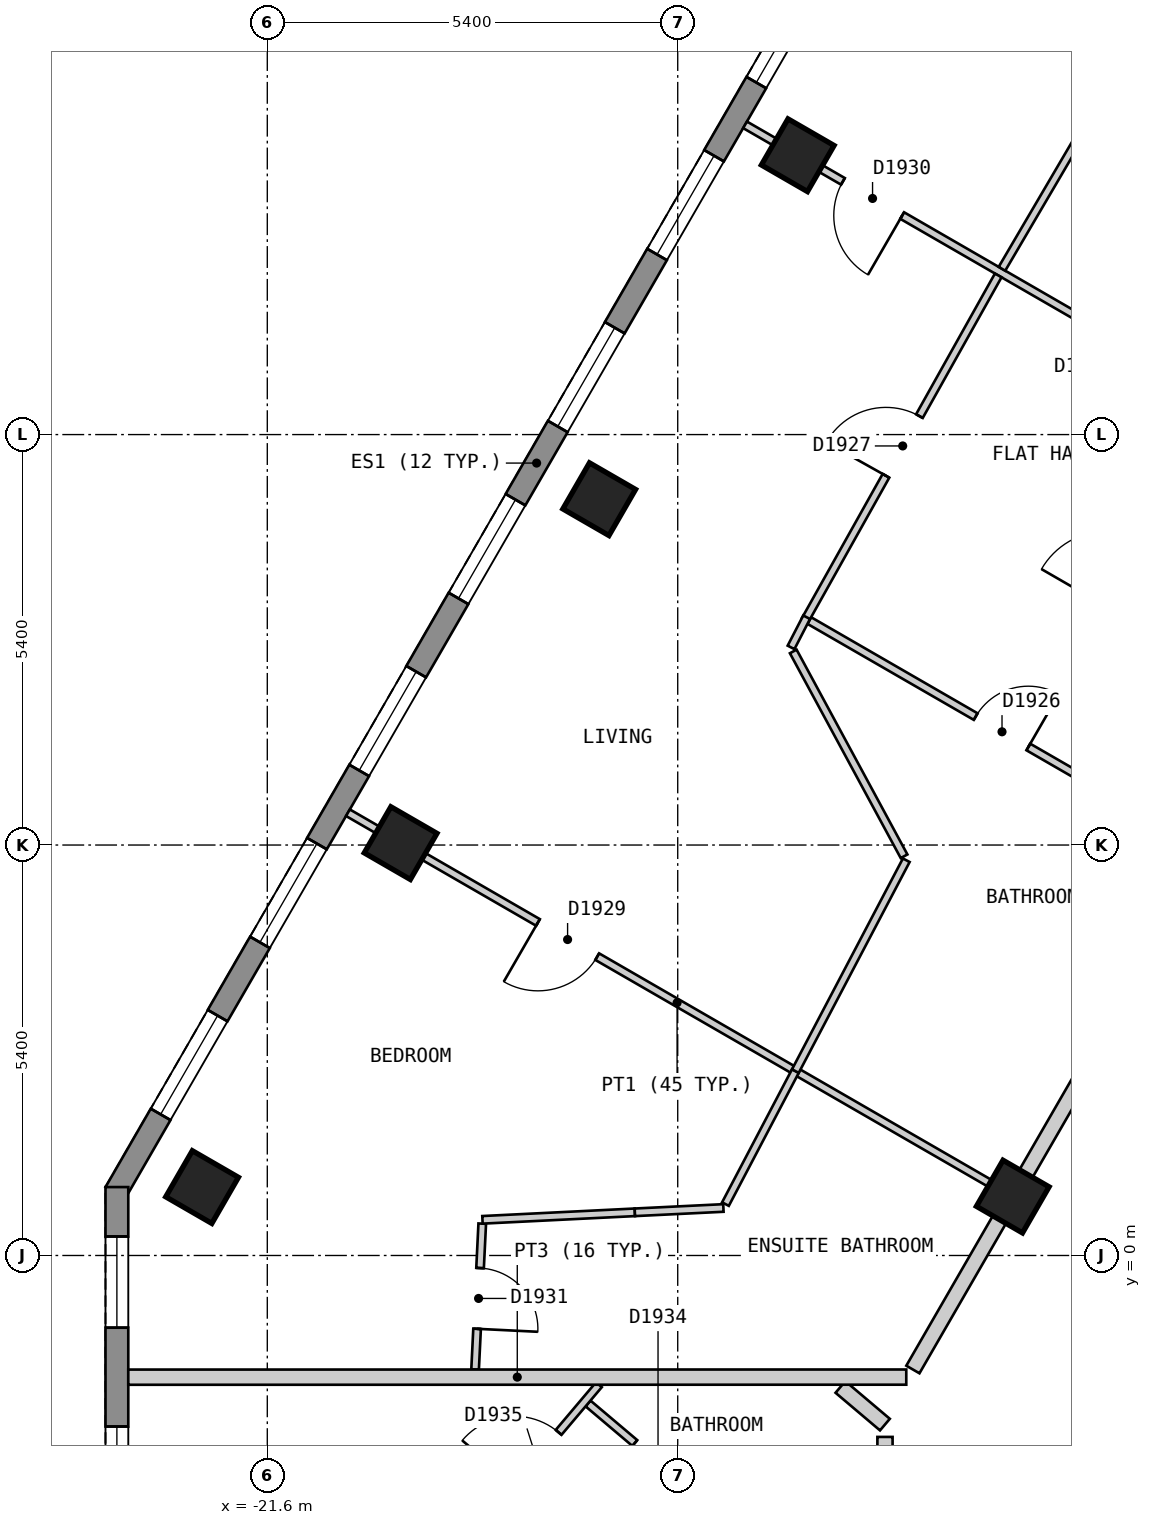
"""IFC4 building model, lengths in metres.
Left out: names, types, materials, properties, quantities, classifications, styles, units other than length and angle.
Written with IfcOpenShell. Run it as: python <this file> out.ifc"""

import sys

from ifc_helpers import new_model, si_unit, direction, frame, frame_2d, origin, origin_2d, place, context, subcontext, project, spatial, polyline, rectangle, outline, extrude, element, fill, save


model = new_model("IFC4")
c1 = context("Model", 3, precision=1e-05, world=origin(), true_north=direction((0.0, 1.0)))
c2 = subcontext(c1, "Body", "Model", "MODEL_VIEW")
j1 = project(units=[si_unit("LENGTHUNIT", "METRE"), si_unit("PLANEANGLEUNIT", "RADIAN")], contexts=[c1])
p1 = place(None, origin())
s1 = spatial("IfcSite", under=j1, at=p1, CompositionType="ELEMENT")
p2 = place(p1, origin())
s2 = spatial("IfcBuilding", under=s1, at=p2, CompositionType="ELEMENT")
p3 = place(p2, frame((0.0, 0.0, 220.8)))
s3 = spatial("IfcBuildingStorey", under=s2, at=p3, CompositionType="ELEMENT", Elevation=220.8)
for number, where, z_axis, x_axis in (
    (1, (-14.621, 14.475, 0.0), (0.0, 0.0, 1.0), (-0.5, -0.866, 0.0)),
    (2, (-17.233, 9.95, 0.0), (0.0, 0.0, 1.0), (-0.5, -0.866, 0.0)),
    (3, (-19.846, 5.425, 0.0), (0.0, 0.0, 1.0), (-0.5, -0.866, 0.0)),
    (4, (-22.458, 0.9, 0.0), (0.0, 0.0, 1.0), (-0.5, -0.866, 0.0)),
    (5, (-11.792, 0.775, 0.0), (0.0, 0.0, 1.0), (-0.5, -0.866, 0.0)),
):
    element("IfcColumn", number, at=place(p3, frame(where, z_axis=z_axis, x_axis=x_axis)), inside=s3, PredefinedType="COLUMN", context=c2, shape_type="SweptSolid", body=[
        extrude(rectangle(XDim=0.7, YDim=0.7, at=origin_2d()), origin(), (0.0, 0.0, 1.0), 3.0),
    ])
p4 = place(p3, frame((-12.514, 20.025, 0.0), z_axis=(0.0, 0.0, 1.0), x_axis=(-0.500003656944, -0.866023292436, 0.0)))
e6 = element("IfcWall", 6, at=p4, inside=s3, PredefinedType="SOLIDWALL", context=c2, shape_type="SweptSolid", body=[
    extrude(outline(polyline([(0.0, -0.15), (22.17, -0.15), (22.09, 0.15), (0.08, 0.15), (0.0, -0.15)])), origin(), (0.0, 0.0, 1.0), 2.7),
])
p5 = place(p4, frame((1.191, 0.0, 0.15)))
e7 = element("IfcOpeningElement", 7, at=p5, cuts=e6, PredefinedType="OPENING", context=c2, shape_type="SweptSolid", body=[
    extrude(rectangle(XDim=1.5, YDim=2.1, at=frame_2d((0.75, 1.05))), frame((0.0, 0.16, 0.0), z_axis=(0.0, -1.0, 0.0), x_axis=(1.0, 0.0, 0.0)), (0.0, 0.0, 1.0), 0.32),
])
p6 = place(p4, frame((3.804, 0.0, 0.15)))
e8 = element("IfcOpeningElement", 8, at=p6, cuts=e6, PredefinedType="OPENING", context=c2, shape_type="SweptSolid", body=[
    extrude(rectangle(XDim=1.5, YDim=2.1, at=frame_2d((0.75, 1.05))), frame((0.0, 0.16, 0.0), z_axis=(0.0, -1.0, 0.0), x_axis=(1.0, 0.0, 0.0)), (0.0, 0.0, 1.0), 0.32),
])
p7 = place(p4, frame((6.416, 0.0, 0.15)))
e9 = element("IfcOpeningElement", 9, at=p7, cuts=e6, PredefinedType="OPENING", context=c2, shape_type="SweptSolid", body=[
    extrude(rectangle(XDim=1.5, YDim=2.1, at=frame_2d((0.75, 1.05))), frame((0.0, 0.16, 0.0), z_axis=(0.0, -1.0, 0.0), x_axis=(1.0, 0.0, 0.0)), (0.0, 0.0, 1.0), 0.32),
])
p8 = place(p4, frame((9.029, 0.0, 0.15)))
e10 = element("IfcOpeningElement", 10, at=p8, cuts=e6, PredefinedType="OPENING", context=c2, shape_type="SweptSolid", body=[
    extrude(rectangle(XDim=1.5, YDim=2.1, at=frame_2d((0.75, 1.05))), frame((0.0, 0.16, 0.0), z_axis=(0.0, -1.0, 0.0), x_axis=(1.0, 0.0, 0.0)), (0.0, 0.0, 1.0), 0.32),
])
p9 = place(p4, frame((11.641, 0.0, 0.15)))
e11 = element("IfcOpeningElement", 11, at=p9, cuts=e6, PredefinedType="OPENING", context=c2, shape_type="SweptSolid", body=[
    extrude(rectangle(XDim=1.5, YDim=2.1, at=frame_2d((0.75, 1.05))), frame((0.0, 0.16, 0.0), z_axis=(0.0, -1.0, 0.0), x_axis=(1.0, 0.0, 0.0)), (0.0, 0.0, 1.0), 0.32),
])
p10 = place(p4, frame((14.254, 0.0, 0.15)))
e12 = element("IfcOpeningElement", 12, at=p10, cuts=e6, PredefinedType="OPENING", context=c2, shape_type="SweptSolid", body=[
    extrude(rectangle(XDim=1.5, YDim=2.1, at=frame_2d((0.75, 1.05))), frame((0.0, 0.16, 0.0), z_axis=(0.0, -1.0, 0.0), x_axis=(1.0, 0.0, 0.0)), (0.0, 0.0, 1.0), 0.32),
])
p11 = place(p4, frame((16.866, 0.0, 0.15)))
e13 = element("IfcOpeningElement", 13, at=p11, cuts=e6, PredefinedType="OPENING", context=c2, shape_type="SweptSolid", body=[
    extrude(rectangle(XDim=1.5, YDim=2.1, at=frame_2d((0.75, 1.05))), frame((0.0, 0.16, 0.0), z_axis=(0.0, -1.0, 0.0), x_axis=(1.0, 0.0, 0.0)), (0.0, 0.0, 1.0), 0.32),
])
p12 = place(p4, frame((19.479, 0.0, 0.15)))
e14 = element("IfcOpeningElement", 14, at=p12, cuts=e6, PredefinedType="OPENING", context=c2, shape_type="SweptSolid", body=[
    extrude(rectangle(XDim=1.5, YDim=2.1, at=frame_2d((0.75, 1.05))), frame((0.0, 0.16, 0.0), z_axis=(0.0, -1.0, 0.0), x_axis=(1.0, 0.0, 0.0)), (0.0, 0.0, 1.0), 0.32),
])
p13 = place(p3, frame((-23.579, 0.9, 0.0), z_axis=(0.0, 0.0, 1.0), x_axis=(0.0, -1.0, 0.0)))
e15 = element("IfcWall", 15, at=p13, inside=s3, PredefinedType="SOLIDWALL", context=c2, shape_type="SweptSolid", body=[
    extrude(outline(polyline([(0.0, -0.15), (5.0, -0.15), (4.92, 0.15), (0.08, 0.15), (0.0, -0.15)])), origin(), (0.0, 0.0, 1.0), 2.7),
])
p14 = place(p13, frame((0.65, 0.0, 0.15)))
e16 = element("IfcOpeningElement", 16, at=p14, cuts=e15, PredefinedType="OPENING", context=c2, shape_type="SweptSolid", body=[
    extrude(rectangle(XDim=1.2, YDim=2.1, at=frame_2d((0.6, 1.05))), frame((0.0, 0.16, 0.0), z_axis=(0.0, -1.0, 0.0), x_axis=(1.0, 0.0, 0.0)), (0.0, 0.0, 1.0), 0.32),
])
p15 = place(p13, frame((3.15, 0.0, 0.15)))
e17 = element("IfcOpeningElement", 17, at=p15, cuts=e15, PredefinedType="OPENING", context=c2, shape_type="SweptSolid", body=[
    extrude(rectangle(XDim=1.2, YDim=2.1, at=frame_2d((0.6, 1.05))), frame((0.0, 0.16, 0.0), z_axis=(0.0, -1.0, 0.0), x_axis=(1.0, 0.0, 0.0)), (0.0, 0.0, 1.0), 0.32),
])
p16 = place(p3, frame((-13.106, -1.5, 0.0), z_axis=(0.0, 0.0, 1.0), x_axis=(0.500025705601, 0.86601056214, 0.0)))
e18 = element("IfcWall", 18, at=p16, inside=s3, PredefinedType="PARTITIONING", context=c2, shape_type="SweptSolid", body=[
    extrude(rectangle(XDim=7.735, YDim=0.2, at=frame_2d((3.868, 0.0))), origin(), (0.0, 0.0, 1.0), 2.7),
])
p17 = place(p3, frame((-13.473, -2.799, 0.0), z_axis=(0.0, 0.0, 1.0), x_axis=(0.0, 1.0, 0.0)))
e19 = element("IfcWall", 19, at=p17, inside=s3, PredefinedType="PARTITIONING", context=c2, shape_type="SweptSolid", body=[
    extrude(rectangle(XDim=0.412, YDim=0.2, at=frame_2d((0.206, 0.0))), origin(), (0.0, 0.0, 1.0), 2.7),
])
p18 = place(p3, frame((-14.68, 7.947, 0.0), z_axis=(0.0, 0.0, 1.0), x_axis=(0.475823637798, -0.879540712936, 0.0)))
e20 = element("IfcWall", 20, at=p18, inside=s3, PredefinedType="PARTITIONING", context=c2, shape_type="SweptSolid", body=[
    extrude(rectangle(XDim=3.064, YDim=0.1, at=frame_2d((1.532, 0.0))), origin(), (0.0, 0.0, 1.0), 2.7),
])
p19 = place(p3, frame((-20.539, 5.825, 0.0), z_axis=(0.0, 0.0, 1.0), x_axis=(0.866047370643, -0.499961950354, 0.0)))
e21 = element("IfcWall", 21, at=p19, inside=s3, PredefinedType="PARTITIONING", context=c2, shape_type="SweptSolid", body=[
    extrude(rectangle(XDim=10.001, YDim=0.1, at=frame_2d((5.0, 0.0))), origin(), (0.0, 0.0, 1.0), 2.7),
])
p20 = place(p19, frame((2.887, 0.0, 0.0)))
e22 = element("IfcOpeningElement", 22, at=p20, cuts=e21, PredefinedType="OPENING", context=c2, shape_type="SweptSolid", body=[
    extrude(rectangle(XDim=0.9, YDim=2.1, at=frame_2d((0.45, 1.05))), frame((0.0, 0.06, 0.0), z_axis=(0.0, -1.0, 0.0), x_axis=(1.0, 0.0, 0.0)), (0.0, 0.0, 1.0), 0.12),
])
p21 = place(p3, frame((-14.47, 8.354, 0.0), z_axis=(0.0, 0.0, 1.0), x_axis=(0.866067902578, -0.499926382705, 0.0)))
e23 = element("IfcWall", 23, at=p21, inside=s3, PredefinedType="PARTITIONING", context=c2, shape_type="SweptSolid", body=[
    extrude(rectangle(XDim=5.907, YDim=0.1, at=frame_2d((2.954, 0.0))), origin(), (0.0, 0.0, 1.0), 2.7),
])
p22 = place(p21, frame((2.529, 0.0, 0.0)))
e24 = element("IfcOpeningElement", 24, at=p22, cuts=e23, PredefinedType="OPENING", context=c2, shape_type="SweptSolid", body=[
    extrude(rectangle(XDim=0.8, YDim=2.1, at=frame_2d((0.4, 1.05))), frame((0.0, 0.06, 0.0), z_axis=(0.0, -1.0, 0.0), x_axis=(1.0, 0.0, 0.0)), (0.0, 0.0, 1.0), 0.12),
])
p23 = place(p3, frame((-15.314, 14.875, 0.0), z_axis=(0.0, 0.0, 1.0), x_axis=(0.866001485781, -0.500041424909, 0.0)))
e25 = element("IfcWall", 25, at=p23, inside=s3, PredefinedType="PARTITIONING", context=c2, shape_type="SweptSolid", body=[
    extrude(rectangle(XDim=7.2, YDim=0.1, at=frame_2d((3.6, 0.0))), origin(), (0.0, 0.0, 1.0), 2.7),
])
p24 = place(p23, frame((5.137, 0.0, 0.0)))
e26 = element("IfcOpeningElement", 26, at=p24, cuts=e25, PredefinedType="OPENING", context=c2, shape_type="SweptSolid", body=[
    extrude(rectangle(XDim=0.9, YDim=2.1, at=frame_2d((0.45, 1.05))), frame((0.0, 0.06, 0.0), z_axis=(0.0, -1.0, 0.0), x_axis=(1.0, 0.0, 0.0)), (0.0, 0.0, 1.0), 0.12),
])
p25 = place(p23, frame((1.487, 0.0, 0.0)))
e27 = element("IfcOpeningElement", 27, at=p25, cuts=e25, PredefinedType="OPENING", context=c2, shape_type="SweptSolid", body=[
    extrude(rectangle(XDim=0.9, YDim=2.1, at=frame_2d((0.45, 1.05))), frame((0.0, 0.06, 0.0), z_axis=(0.0, -1.0, 0.0), x_axis=(1.0, 0.0, 0.0)), (0.0, 0.0, 1.0), 0.12),
])
p26 = place(p3, frame((-17.38, -1.947, 0.0), z_axis=(0.0, 0.0, 1.0), x_axis=(0.763616683524, -0.645669854217, 0.0)))
e28 = element("IfcWall", 28, at=p26, inside=s3, PredefinedType="PARTITIONING", context=c2, shape_type="SweptSolid", body=[
    extrude(rectangle(XDim=2.331, YDim=0.1, at=frame_2d((1.166, 0.0))), origin(), (0.0, 0.0, 1.0), 2.7),
])
p27 = place(p26, frame((0.806, 0.0, 0.0)))
e29 = element("IfcOpeningElement", 29, at=p27, cuts=e28, PredefinedType="OPENING", context=c2, shape_type="SweptSolid", body=[
    extrude(rectangle(XDim=0.8, YDim=2.1, at=frame_2d((0.4, 1.05))), frame((0.0, 0.06, 0.0), z_axis=(0.0, -1.0, 0.0), x_axis=(1.0, 0.0, 0.0)), (0.0, 0.0, 1.0), 0.12),
])
p28 = place(p3, frame((-20.188, -5.191, 0.0), z_axis=(0.0, 0.0, 1.0), x_axis=(0.645563873658, 0.763706281909, 0.0)))
e30 = element("IfcWall", 30, at=p28, inside=s3, PredefinedType="PARTITIONING", context=c2, shape_type="SweptSolid", body=[
    extrude(rectangle(XDim=4.571, YDim=0.1, at=frame_2d((2.286, 0.0))), origin(), (0.0, 0.0, 1.0), 2.7),
])
p29 = place(p28, frame((2.85, 0.0, 0.0)))
e31 = element("IfcOpeningElement", 31, at=p29, cuts=e30, PredefinedType="OPENING", context=c2, shape_type="SweptSolid", body=[
    extrude(rectangle(XDim=0.9, YDim=2.1, at=frame_2d((0.45, 1.05))), frame((0.0, 0.06, 0.0), z_axis=(0.0, -1.0, 0.0), x_axis=(1.0, 0.0, 0.0)), (0.0, 0.0, 1.0), 0.12),
])
p30 = place(p3, frame((-11.934, 12.981, 0.0), z_axis=(0.0, 0.0, 1.0), x_axis=(0.506072703404, 0.862490822484, 0.0)))
e32 = element("IfcWall", 32, at=p30, inside=s3, PredefinedType="PARTITIONING", context=c2, shape_type="SweptSolid", body=[
    extrude(rectangle(XDim=8.212, YDim=0.1, at=frame_2d((4.106, 0.0))), origin(), (0.0, 0.0, 1.0), 2.7),
])
p31 = place(p3, frame((-15.572, 0.676, 0.0), z_axis=(0.0, 0.0, 1.0), x_axis=(0.465298498919, 0.885153832339, 0.0)))
e33 = element("IfcWall", 33, at=p31, inside=s3, PredefinedType="PARTITIONING", context=c2, shape_type="SweptSolid", body=[
    extrude(rectangle(XDim=1.977, YDim=0.1, at=frame_2d((0.989, 0.0))), origin(), (0.0, 0.0, 1.0), 2.7),
])
p32 = place(p3, frame((-14.522, 8.362, 0.0), z_axis=(0.0, 0.0, 1.0), x_axis=(0.488772229601, 0.872411432508, 0.0)))
e34 = element("IfcWall", 34, at=p32, inside=s3, PredefinedType="PARTITIONING", context=c2, shape_type="SweptSolid", body=[
    extrude(rectangle(XDim=5.195, YDim=0.1, at=frame_2d((2.597, 0.0))), origin(), (0.0, 0.0, 1.0), 2.7),
])
p33 = place(p32, frame((2.173, 0.0, 0.0)))
e35 = element("IfcOpeningElement", 35, at=p33, cuts=e34, PredefinedType="OPENING", context=c2, shape_type="SweptSolid", body=[
    extrude(rectangle(XDim=0.9, YDim=2.1, at=frame_2d((0.45, 1.05))), frame((0.0, 0.06, 0.0), z_axis=(0.0, -1.0, 0.0), x_axis=(1.0, 0.0, 0.0)), (0.0, 0.0, 1.0), 0.12),
])
p34 = place(p3, frame((-14.709, 8.0, 0.0), z_axis=(0.0, 0.0, 1.0), x_axis=(0.458976923864, 0.888448188337, 0.0)))
e36 = element("IfcWall", 36, at=p34, inside=s3, PredefinedType="PARTITIONING", context=c2, shape_type="SweptSolid", body=[
    extrude(rectangle(XDim=0.447, YDim=0.1, at=frame_2d((0.223, 0.0))), origin(), (0.0, 0.0, 1.0), 2.7),
])
p35 = place(p3, frame((-18.866, -1.5, 0.0), z_axis=(0.0, 0.0, 1.0), x_axis=(0.048923533446, 0.998802526967, 0.0)))
e37 = element("IfcWall", 37, at=p35, inside=s3, PredefinedType="PARTITIONING", context=c2, shape_type="SweptSolid", body=[
    extrude(rectangle(XDim=1.921, YDim=0.1, at=frame_2d((0.96, 0.0))), origin(), (0.0, 0.0, 1.0), 2.7),
])
p36 = place(p35, frame((0.536, 0.0, 0.0)))
e38 = element("IfcOpeningElement", 38, at=p36, cuts=e37, PredefinedType="OPENING", context=c2, shape_type="SweptSolid", body=[
    extrude(rectangle(XDim=0.8, YDim=2.1, at=frame_2d((0.4, 1.05))), frame((0.0, 0.06, 0.0), z_axis=(0.0, -1.0, 0.0), x_axis=(1.0, 0.0, 0.0)), (0.0, 0.0, 1.0), 0.12),
])
p37 = place(p3, frame((-18.769, 0.469, 0.0), z_axis=(0.0, 0.0, 1.0), x_axis=(0.998780383332, 0.049373534108, 0.0)))
e39 = element("IfcWall", 39, at=p37, inside=s3, PredefinedType="PARTITIONING", context=c2, shape_type="SweptSolid", body=[
    extrude(rectangle(XDim=2.008, YDim=0.1, at=frame_2d((1.004, 0.0))), origin(), (0.0, 0.0, 1.0), 2.7),
])
p38 = place(p3, frame((-16.764, 0.568, 0.0), z_axis=(0.0, 0.0, 1.0), x_axis=(0.998809616198, 0.048778587419, 0.0)))
e40 = element("IfcWall", 40, at=p38, inside=s3, PredefinedType="PARTITIONING", context=c2, shape_type="SweptSolid", body=[
    extrude(rectangle(XDim=1.166, YDim=0.1, at=frame_2d((0.583, 0.0))), origin(), (0.0, 0.0, 1.0), 2.7),
])
p39 = place(p3, frame((-14.059, -1.73, 0.0), z_axis=(0.0, 0.0, 1.0), x_axis=(0.763289607824, -0.64605647941, 0.0)))
e41 = element("IfcWall", 41, at=p39, inside=s3, PredefinedType="PARTITIONING", context=c2, shape_type="SweptSolid", body=[
    extrude(rectangle(XDim=0.766, YDim=0.2, at=frame_2d((0.383, 0.0))), origin(), (0.0, 0.0, 1.0), 2.7),
])
p40 = place(p3, frame((-23.429, -1.601, 0.0), z_axis=(0.0, 0.0, 1.0), x_axis=(0.999999995449, 9.5406191e-05, 0.0)))
e42 = element("IfcWall", 42, at=p40, inside=s3, PredefinedType="PARTITIONING", context=c2, shape_type="SweptSolid", body=[
    extrude(rectangle(XDim=10.236, YDim=0.2, at=frame_2d((5.118, 0.0))), origin(), (0.0, 0.0, 1.0), 2.7),
])
p41 = place(p3, frame((-14.652, 2.426, 0.0), z_axis=(0.0, 0.0, 1.0), x_axis=(0.465502421984, 0.885046606189, 0.0)))
e43 = element("IfcWall", 43, at=p41, inside=s3, PredefinedType="PARTITIONING", context=c2, shape_type="SweptSolid", body=[
    extrude(rectangle(XDim=3.134, YDim=0.1, at=frame_2d((1.567, 0.0))), origin(), (0.0, 0.0, 1.0), 2.7),
])
p42 = place(p6, origin())
e44 = element("IfcWindow", 44, at=p42, inside=s3, PartitioningType="SINGLE_PANEL", PredefinedType="WINDOW", context=c2, shape_type="SweptSolid", body=[
    extrude(rectangle(XDim=1.5, YDim=2.1, at=frame_2d((0.75, 1.05))), frame((0.0, 0.03, 0.0), z_axis=(0.0, -1.0, 0.0), x_axis=(1.0, 0.0, 0.0)), (0.0, 0.0, 1.0), 0.06),
])
fill(e8, e44)
p43 = place(p7, origin())
e45 = element("IfcWindow", 45, at=p43, inside=s3, PartitioningType="SINGLE_PANEL", PredefinedType="WINDOW", context=c2, shape_type="SweptSolid", body=[
    extrude(rectangle(XDim=1.5, YDim=2.1, at=frame_2d((0.75, 1.05))), frame((0.0, 0.03, 0.0), z_axis=(0.0, -1.0, 0.0), x_axis=(1.0, 0.0, 0.0)), (0.0, 0.0, 1.0), 0.06),
])
fill(e9, e45)
p44 = place(p8, origin())
e46 = element("IfcWindow", 46, at=p44, inside=s3, PartitioningType="SINGLE_PANEL", PredefinedType="WINDOW", context=c2, shape_type="SweptSolid", body=[
    extrude(rectangle(XDim=1.5, YDim=2.1, at=frame_2d((0.75, 1.05))), frame((0.0, 0.03, 0.0), z_axis=(0.0, -1.0, 0.0), x_axis=(1.0, 0.0, 0.0)), (0.0, 0.0, 1.0), 0.06),
])
fill(e10, e46)
p45 = place(p9, origin())
e47 = element("IfcWindow", 47, at=p45, inside=s3, PartitioningType="SINGLE_PANEL", PredefinedType="WINDOW", context=c2, shape_type="SweptSolid", body=[
    extrude(rectangle(XDim=1.5, YDim=2.1, at=frame_2d((0.75, 1.05))), frame((0.0, 0.03, 0.0), z_axis=(0.0, -1.0, 0.0), x_axis=(1.0, 0.0, 0.0)), (0.0, 0.0, 1.0), 0.06),
])
fill(e11, e47)
p46 = place(p10, origin())
e48 = element("IfcWindow", 48, at=p46, inside=s3, PartitioningType="SINGLE_PANEL", PredefinedType="WINDOW", context=c2, shape_type="SweptSolid", body=[
    extrude(rectangle(XDim=1.5, YDim=2.1, at=frame_2d((0.75, 1.05))), frame((0.0, 0.03, 0.0), z_axis=(0.0, -1.0, 0.0), x_axis=(1.0, 0.0, 0.0)), (0.0, 0.0, 1.0), 0.06),
])
fill(e12, e48)
p47 = place(p11, origin())
e49 = element("IfcWindow", 49, at=p47, inside=s3, PartitioningType="SINGLE_PANEL", PredefinedType="WINDOW", context=c2, shape_type="SweptSolid", body=[
    extrude(rectangle(XDim=1.5, YDim=2.1, at=frame_2d((0.75, 1.05))), frame((0.0, 0.03, 0.0), z_axis=(0.0, -1.0, 0.0), x_axis=(1.0, 0.0, 0.0)), (0.0, 0.0, 1.0), 0.06),
])
fill(e13, e49)
p48 = place(p12, origin())
e50 = element("IfcWindow", 50, at=p48, inside=s3, PartitioningType="SINGLE_PANEL", PredefinedType="WINDOW", context=c2, shape_type="SweptSolid", body=[
    extrude(rectangle(XDim=1.5, YDim=2.1, at=frame_2d((0.75, 1.05))), frame((0.0, 0.03, 0.0), z_axis=(0.0, -1.0, 0.0), x_axis=(1.0, 0.0, 0.0)), (0.0, 0.0, 1.0), 0.06),
])
fill(e14, e50)
p49 = place(p14, origin())
e51 = element("IfcWindow", 51, at=p49, inside=s3, PartitioningType="SINGLE_PANEL", PredefinedType="WINDOW", context=c2, shape_type="SweptSolid", body=[
    extrude(rectangle(XDim=1.2, YDim=2.1, at=frame_2d((0.6, 1.05))), frame((0.0, 0.03, 0.0), z_axis=(0.0, -1.0, 0.0), x_axis=(1.0, 0.0, 0.0)), (0.0, 0.0, 1.0), 0.06),
])
fill(e16, e51)
p50 = place(p15, origin())
e52 = element("IfcWindow", 52, at=p50, inside=s3, PartitioningType="SINGLE_PANEL", PredefinedType="WINDOW", context=c2, shape_type="SweptSolid", body=[
    extrude(rectangle(XDim=1.2, YDim=2.1, at=frame_2d((0.6, 1.05))), frame((0.0, 0.03, 0.0), z_axis=(0.0, -1.0, 0.0), x_axis=(1.0, 0.0, 0.0)), (0.0, 0.0, 1.0), 0.06),
])
fill(e17, e52)
p51 = place(p22, origin())
e53 = element("IfcDoor", 53, at=p51, inside=s3, OperationType="SINGLE_SWING_RIGHT", PredefinedType="DOOR", context=c2, shape_type="SweptSolid", body=[
    extrude(rectangle(XDim=0.8, YDim=2.1, at=frame_2d((0.4, 1.05))), frame((0.0, 0.025, 0.0), z_axis=(0.0, -1.0, 0.0), x_axis=(1.0, 0.0, 0.0)), (0.0, 0.0, 1.0), 0.05),
])
fill(e24, e53)
p52 = place(p33, origin())
e54 = element("IfcDoor", 54, at=p52, inside=s3, OperationType="SINGLE_SWING_LEFT", PredefinedType="DOOR", context=c2, shape_type="SweptSolid", body=[
    extrude(rectangle(XDim=0.9, YDim=2.1, at=frame_2d((0.45, 1.05))), frame((0.0, 0.025, 0.0), z_axis=(0.0, -1.0, 0.0), x_axis=(1.0, 0.0, 0.0)), (0.0, 0.0, 1.0), 0.05),
])
fill(e35, e54)
p53 = place(p20, origin())
e55 = element("IfcDoor", 55, at=p53, inside=s3, OperationType="SINGLE_SWING_LEFT", PredefinedType="DOOR", context=c2, shape_type="SweptSolid", body=[
    extrude(rectangle(XDim=0.9, YDim=2.1, at=frame_2d((0.45, 1.05))), frame((0.0, 0.025, 0.0), z_axis=(0.0, -1.0, 0.0), x_axis=(1.0, 0.0, 0.0)), (0.0, 0.0, 1.0), 0.05),
])
fill(e22, e55)
p54 = place(p25, origin())
e56 = element("IfcDoor", 56, at=p54, inside=s3, OperationType="SINGLE_SWING_RIGHT", PredefinedType="DOOR", context=c2, shape_type="SweptSolid", body=[
    extrude(rectangle(XDim=0.9, YDim=2.1, at=frame_2d((0.45, 1.05))), frame((0.0, 0.025, 0.0), z_axis=(0.0, -1.0, 0.0), x_axis=(1.0, 0.0, 0.0)), (0.0, 0.0, 1.0), 0.05),
])
fill(e27, e56)
p55 = place(p36, origin())
e57 = element("IfcDoor", 57, at=p55, inside=s3, OperationType="SINGLE_SWING_LEFT", PredefinedType="DOOR", context=c2, shape_type="SweptSolid", body=[
    extrude(rectangle(XDim=0.8, YDim=2.1, at=frame_2d((0.4, 1.05))), frame((0.0, 0.025, 0.0), z_axis=(0.0, -1.0, 0.0), x_axis=(1.0, 0.0, 0.0)), (0.0, 0.0, 1.0), 0.05),
])
fill(e38, e57)
p56 = place(p27, origin())
e58 = element("IfcDoor", 58, at=p56, inside=s3, OperationType="SINGLE_SWING_RIGHT", PredefinedType="DOOR", context=c2, shape_type="SweptSolid", body=[
    extrude(rectangle(XDim=0.8, YDim=2.1, at=frame_2d((0.4, 1.05))), frame((0.0, 0.025, 0.0), z_axis=(0.0, -1.0, 0.0), x_axis=(1.0, 0.0, 0.0)), (0.0, 0.0, 1.0), 0.05),
])
fill(e29, e58)
p57 = place(p29, origin())
e59 = element("IfcDoor", 59, at=p57, inside=s3, OperationType="SINGLE_SWING_LEFT", PredefinedType="DOOR", context=c2, shape_type="SweptSolid", body=[
    extrude(rectangle(XDim=0.9, YDim=2.1, at=frame_2d((0.45, 1.05))), frame((0.0, 0.025, 0.0), z_axis=(0.0, -1.0, 0.0), x_axis=(1.0, 0.0, 0.0)), (0.0, 0.0, 1.0), 0.05),
])
fill(e31, e59)
save(model, sys.argv[1])
